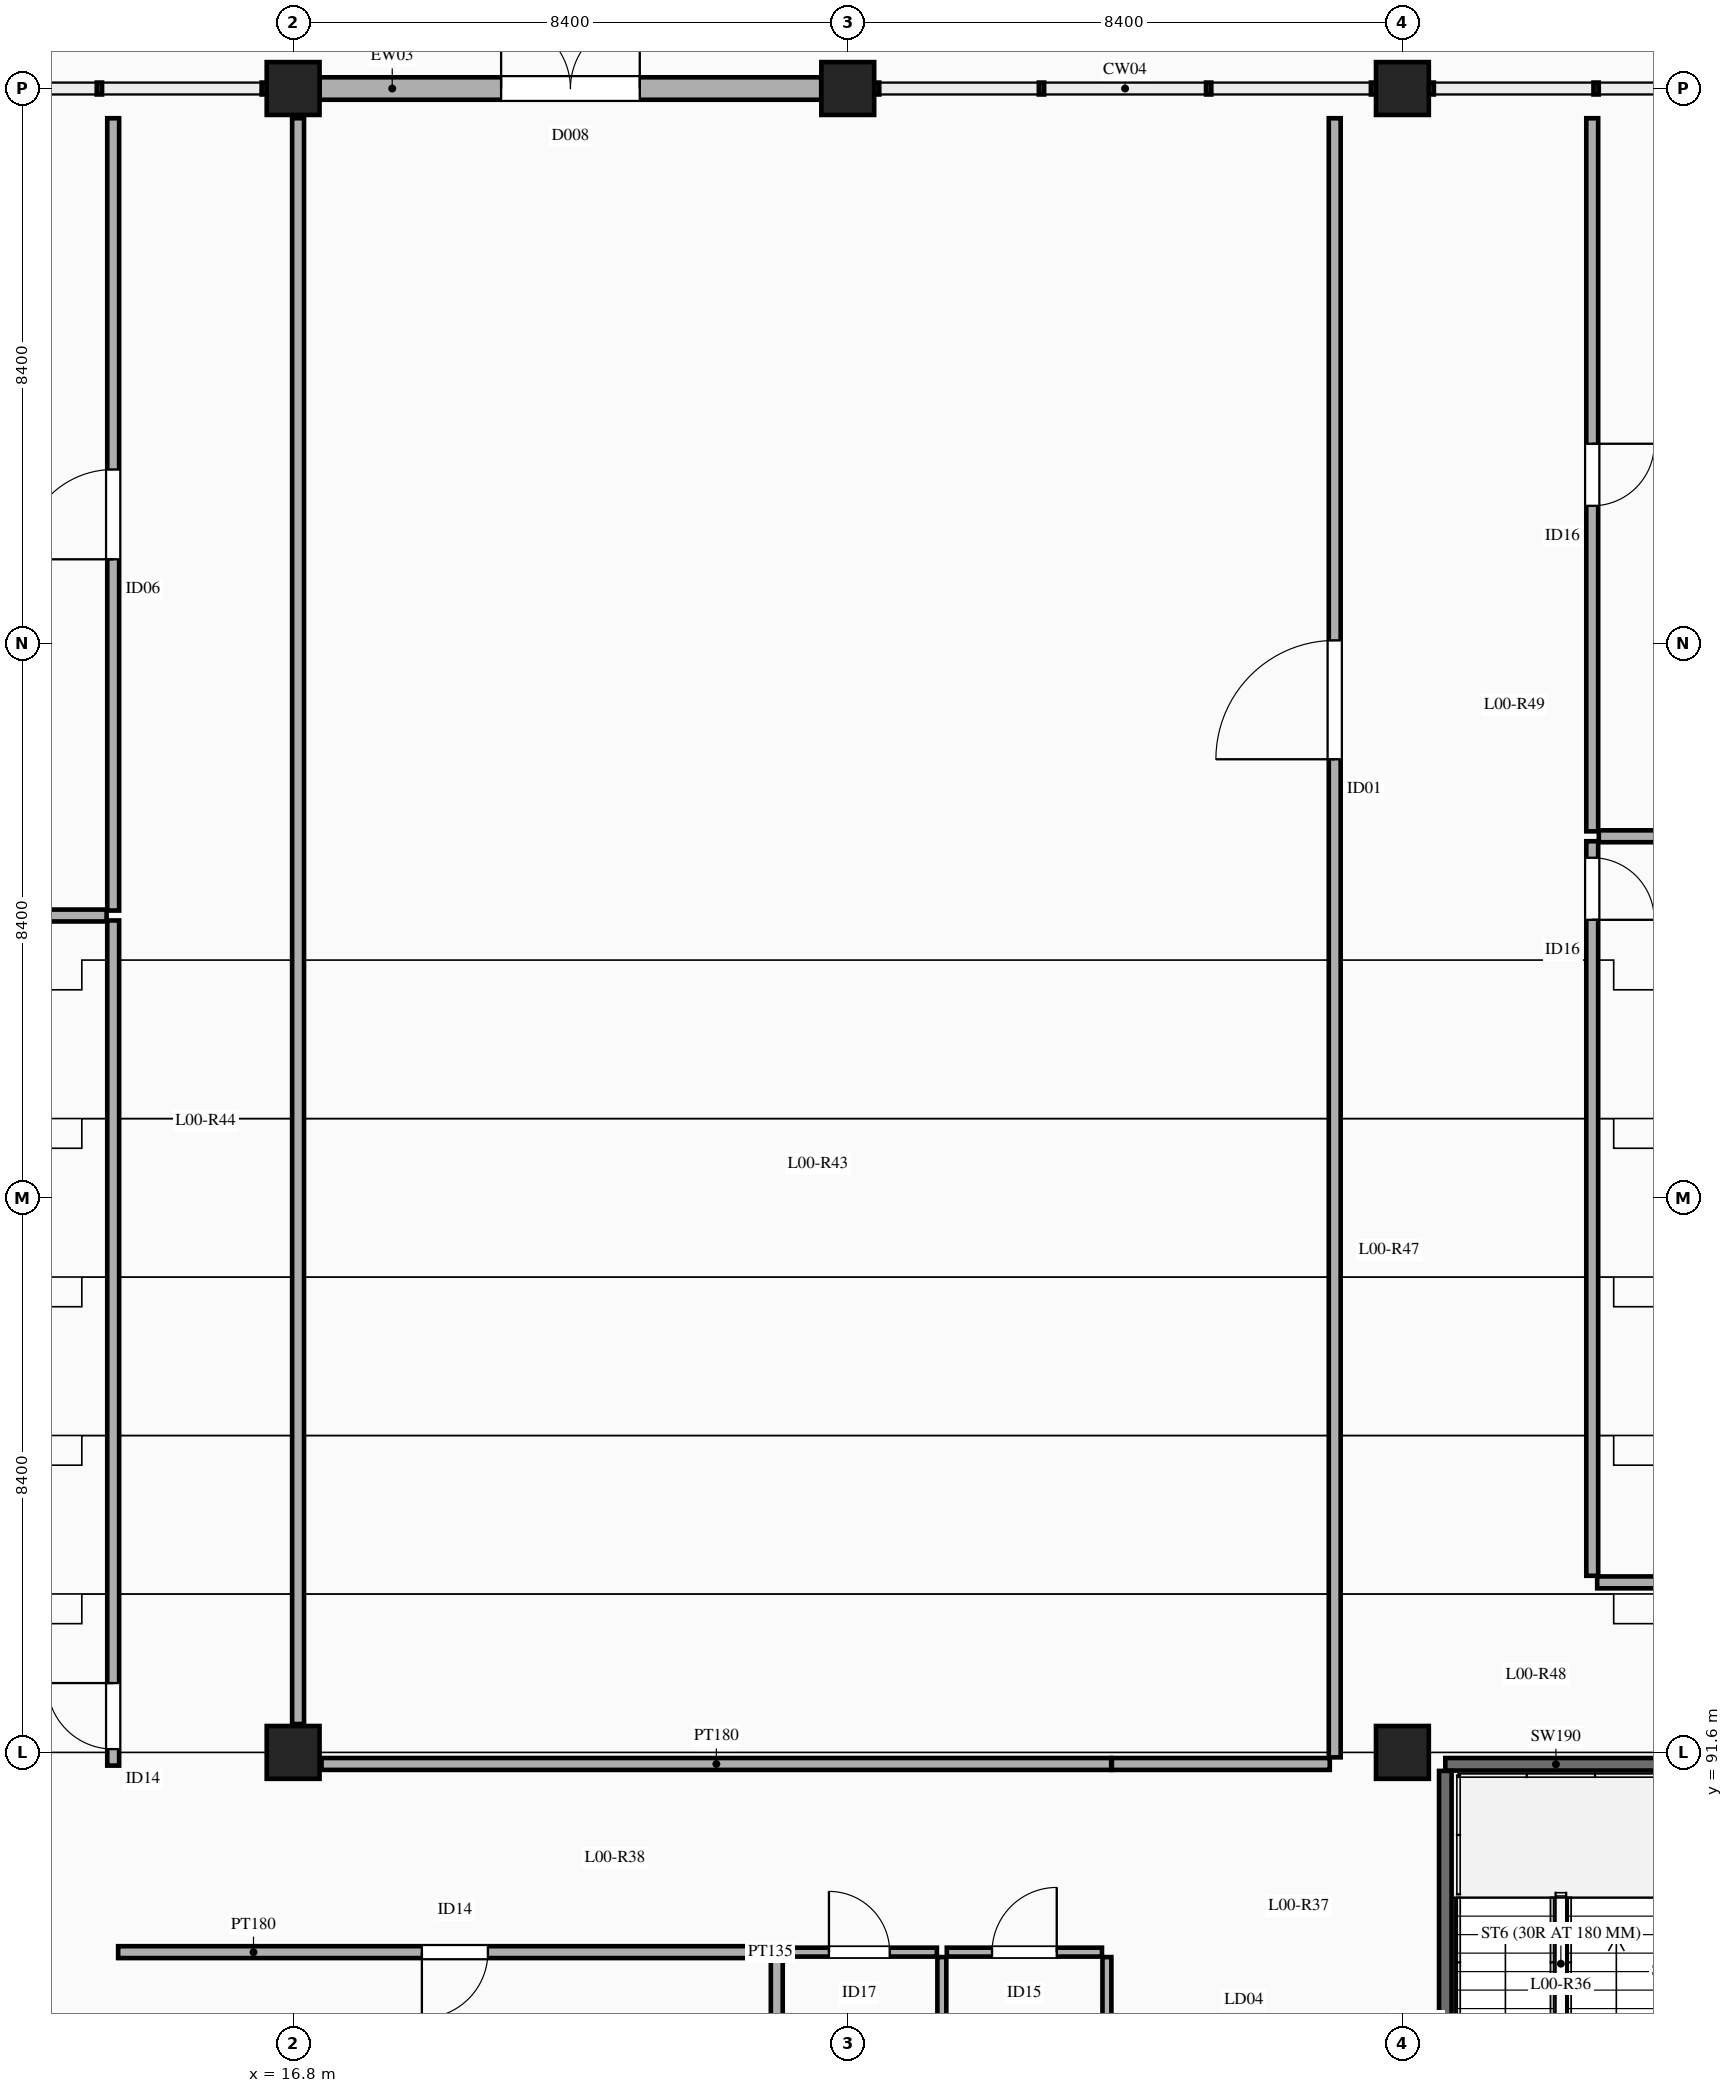
"""IFC4 building model, lengths in metres.
Left out: names, types, materials, properties, quantities, classifications, styles, units other than length and angle.
Written with IfcOpenShell. Run it as: python <this file> out.ifc"""

import sys

from ifc_helpers import new_model, si_unit, direction, frame, frame_2d, origin, origin_2d, place, context, subcontext, project, spatial, rectangle, extrude, element, fill, save


model = new_model("IFC4")
c1 = context("Model", 3, precision=1e-05, world=origin(), true_north=direction((0.0, 1.0)))
c2 = subcontext(c1, "Body", "Model", "MODEL_VIEW")
j1 = project(units=[si_unit("LENGTHUNIT", "METRE"), si_unit("PLANEANGLEUNIT", "RADIAN")], contexts=[c1])
p1 = place(None, origin())
s1 = spatial("IfcSite", under=j1, at=p1, CompositionType="ELEMENT")
p2 = place(p1, origin())
s2 = spatial("IfcBuilding", under=s1, at=p2, CompositionType="ELEMENT")
p3 = place(p2, origin())
s3 = spatial("IfcBuildingStorey", under=s2, at=p3, CompositionType="ELEMENT", Elevation=0.0)
for number, where, z_axis, x_axis in (
    (1, (16.8, 91.6, 0.0), (0.0, 0.0, 1.0), (1.0, 0.0, 0.0)),
    (2, (16.8, 116.8, 0.0), (0.0, 0.0, 1.0), (1.0, 0.0, 0.0)),
    (3, (25.2, 116.8, 0.0), (0.0, 0.0, 1.0), (1.0, 0.0, 0.0)),
    (4, (33.6, 91.6, 0.0), (0.0, 0.0, 1.0), (1.0, 0.0, 0.0)),
    (5, (33.6, 116.8, 0.0), (0.0, 0.0, 1.0), (1.0, 0.0, 0.0)),
):
    element("IfcColumn", number, at=place(p3, frame(where, z_axis=z_axis, x_axis=x_axis)), inside=s3, PredefinedType="COLUMN", context=c2, shape_type="SweptSolid", body=[
        extrude(rectangle(XDim=0.8, YDim=0.8, at=origin_2d()), origin(), (0.0, 0.0, 1.0), 5.4),
    ])
p4 = place(p3, frame((17.202, 116.8, 0.0), z_axis=(0.0, 0.0, 1.0), x_axis=(1.0, 0.0, 0.0)))
e6 = element("IfcWall", 6, at=p4, inside=s3, PredefinedType="SOLIDWALL", context=c2, shape_type="SweptSolid", body=[
    extrude(rectangle(XDim=7.596, YDim=0.34, at=frame_2d((3.798, 0.0))), origin(), (0.0, 0.0, 1.0), 4.65),
])
p5 = place(p4, frame((2.748, 0.0, 0.0)))
e7 = element("IfcOpeningElement", 7, at=p5, cuts=e6, PredefinedType="OPENING", context=c2, shape_type="SweptSolid", body=[
    extrude(rectangle(XDim=2.1, YDim=2.35, at=frame_2d((1.05, 1.175))), frame((0.0, 0.18, 0.0), z_axis=(0.0, -1.0, 0.0), x_axis=(1.0, 0.0, 0.0)), (0.0, 0.0, 1.0), 0.36),
])
p6 = place(p3, frame((34.25, 91.42, 0.0), z_axis=(0.0, 0.0, 1.0), x_axis=(1.0, 0.0, 0.0)))
e8 = element("IfcWall", 8, at=p6, inside=s3, PredefinedType="SOLIDWALL", context=c2, shape_type="SweptSolid", body=[
    extrude(rectangle(XDim=3.5, YDim=0.19, at=frame_2d((1.75, 0.0))), origin(), (0.0, 0.0, 1.0), 5.2),
])
p7 = place(p3, frame((34.25, 83.74, 0.0), z_axis=(0.0, 0.0, 1.0), x_axis=(0.0, 1.0, 0.0)))
e9 = element("IfcWall", 9, at=p7, inside=s3, PredefinedType="SOLIDWALL", context=c2, shape_type="SweptSolid", body=[
    extrude(rectangle(XDim=7.58, YDim=0.19, at=frame_2d((3.79, 0.0))), origin(), (0.0, 0.0, 1.0), 5.2),
])
p8 = place(p3, frame((29.125, 86.5, 0.0), z_axis=(0.0, 0.0, 1.0), x_axis=(0.0, 1.0, 0.0)))
e10 = element("IfcWall", 10, at=p8, inside=s3, PredefinedType="PARTITIONING", context=c2, shape_type="SweptSolid", body=[
    extrude(rectangle(XDim=2.0, YDim=0.135, at=frame_2d((1.0, 0.0))), origin(), (0.0, 0.0, 1.0), 4.35),
])
p9 = place(p3, frame((29.2, 91.425, 0.0), z_axis=(0.0, 0.0, 1.0), x_axis=(1.0, 0.0, 0.0)))
e11 = element("IfcWall", 11, at=p9, inside=s3, PredefinedType="PARTITIONING", context=c2, shape_type="SweptSolid", body=[
    extrude(rectangle(XDim=3.3, YDim=0.18, at=frame_2d((1.65, 0.0))), origin(), (0.0, 0.0, 1.0), 4.35),
])
p10 = place(p3, frame((26.7, 88.575, 0.0), z_axis=(0.0, 0.0, 1.0), x_axis=(1.0, 0.0, 0.0)))
e12 = element("IfcWall", 12, at=p10, inside=s3, PredefinedType="PARTITIONING", context=c2, shape_type="SweptSolid", body=[
    extrude(rectangle(XDim=2.35, YDim=0.135, at=frame_2d((1.175, 0.0))), origin(), (0.0, 0.0, 1.0), 4.35),
])
p11 = place(p10, frame((0.685, 0.0, 0.0)))
e13 = element("IfcOpeningElement", 13, at=p11, cuts=e12, PredefinedType="OPENING", context=c2, shape_type="SweptSolid", body=[
    extrude(rectangle(XDim=0.98, YDim=2.15, at=frame_2d((0.49, 1.075))), frame((0.0, 0.077, 0.0), z_axis=(0.0, -1.0, 0.0), x_axis=(1.0, 0.0, 0.0)), (0.0, 0.0, 1.0), 0.155),
])
p12 = place(p3, frame((24.2, 88.575, 0.0), z_axis=(0.0, 0.0, 1.0), x_axis=(1.0, 0.0, 0.0)))
e14 = element("IfcWall", 14, at=p12, inside=s3, PredefinedType="PARTITIONING", context=c2, shape_type="SweptSolid", body=[
    extrude(rectangle(XDim=2.35, YDim=0.135, at=frame_2d((1.175, 0.0))), origin(), (0.0, 0.0, 1.0), 4.35),
])
p13 = place(p12, frame((0.715, 0.0, 0.0)))
e15 = element("IfcOpeningElement", 15, at=p13, cuts=e14, PredefinedType="OPENING", context=c2, shape_type="SweptSolid", body=[
    extrude(rectangle(XDim=0.92, YDim=2.12, at=frame_2d((0.46, 1.06))), frame((0.0, 0.077, 0.0), z_axis=(0.0, -1.0, 0.0), x_axis=(1.0, 0.0, 0.0)), (0.0, 0.0, 1.0), 0.155),
])
p14 = place(p3, frame((14.15, 88.575, 0.0), z_axis=(0.0, 0.0, 1.0), x_axis=(1.0, 0.0, 0.0)))
e16 = element("IfcWall", 16, at=p14, inside=s3, PredefinedType="PARTITIONING", context=c2, shape_type="SweptSolid", body=[
    extrude(rectangle(XDim=9.9, YDim=0.18, at=frame_2d((4.95, 0.0))), origin(), (0.0, 0.0, 1.0), 4.35),
])
p15 = place(p14, frame((4.6, 0.0, 0.0)))
e17 = element("IfcOpeningElement", 17, at=p15, cuts=e16, PredefinedType="OPENING", context=c2, shape_type="SweptSolid", body=[
    extrude(rectangle(XDim=1.0, YDim=2.15, at=frame_2d((0.5, 1.075))), frame((0.0, 0.1, 0.0), z_axis=(0.0, -1.0, 0.0), x_axis=(1.0, 0.0, 0.0)), (0.0, 0.0, 1.0), 0.2),
])
p16 = place(p3, frame((17.23, 91.425, 0.0), z_axis=(0.0, 0.0, 1.0), x_axis=(1.0, 0.0, 0.0)))
e18 = element("IfcWall", 18, at=p16, inside=s3, PredefinedType="PARTITIONING", context=c2, shape_type="SweptSolid", body=[
    extrude(rectangle(XDim=11.96, YDim=0.18, at=frame_2d((5.98, 0.0))), origin(), (0.0, 0.0, 1.0), 4.35),
])
p17 = place(p3, frame((26.625, 83.6, 0.0), z_axis=(0.0, 0.0, 1.0), x_axis=(0.0, 1.0, 0.0)))
e19 = element("IfcWall", 19, at=p17, inside=s3, PredefinedType="PARTITIONING", context=c2, shape_type="SweptSolid", body=[
    extrude(rectangle(XDim=4.9, YDim=0.135, at=frame_2d((2.45, 0.0))), origin(), (0.0, 0.0, 1.0), 4.35),
])
p18 = place(p3, frame((24.125, 83.6, 0.0), z_axis=(0.0, 0.0, 1.0), x_axis=(0.0, 1.0, 0.0)))
e20 = element("IfcWall", 20, at=p18, inside=s3, PredefinedType="PARTITIONING", context=c2, shape_type="SweptSolid", body=[
    extrude(rectangle(XDim=4.875, YDim=0.18, at=frame_2d((2.438, 0.0))), origin(), (0.0, 0.0, 1.0), 4.35),
])
p19 = place(p3, frame((16.875, 92.03, 0.0), z_axis=(0.0, 0.0, 1.0), x_axis=(0.0, 1.0, 0.0)))
e21 = element("IfcWall", 21, at=p19, inside=s3, PredefinedType="PARTITIONING", context=c2, shape_type="SweptSolid", body=[
    extrude(rectangle(XDim=24.32, YDim=0.18, at=frame_2d((12.16, 0.0))), origin(), (0.0, 0.0, 1.0), 4.35),
])
p20 = place(p3, frame((32.575, 91.525, 0.0), z_axis=(0.0, 0.0, 1.0), x_axis=(0.0, 1.0, 0.0)))
e22 = element("IfcWall", 22, at=p20, inside=s3, PredefinedType="PARTITIONING", context=c2, shape_type="SweptSolid", body=[
    extrude(rectangle(XDim=24.825, YDim=0.18, at=frame_2d((12.413, 0.0))), origin(), (0.0, 0.0, 1.0), 4.35),
])
p21 = place(p20, frame((15.116, 0.0, 0.0)))
e23 = element("IfcOpeningElement", 23, at=p21, cuts=e22, PredefinedType="OPENING", context=c2, shape_type="SweptSolid", body=[
    extrude(rectangle(XDim=1.8, YDim=2.4, at=frame_2d((0.9, 1.2))), frame((0.0, 0.1, 0.0), z_axis=(0.0, -1.0, 0.0), x_axis=(1.0, 0.0, 0.0)), (0.0, 0.0, 1.0), 0.2),
])
p22 = place(p3, frame((14.075, 91.4, 0.0), z_axis=(0.0, 0.0, 1.0), x_axis=(0.0, 1.0, 0.0)))
e24 = element("IfcWall", 24, at=p22, inside=s3, PredefinedType="PARTITIONING", context=c2, shape_type="SweptSolid", body=[
    extrude(rectangle(XDim=12.8, YDim=0.18, at=frame_2d((6.4, 0.0))), origin(), (0.0, 0.0, 1.0), 4.35),
])
p23 = place(p22, frame((0.25, 0.0, 0.0)))
e25 = element("IfcOpeningElement", 25, at=p23, cuts=e24, PredefinedType="OPENING", context=c2, shape_type="SweptSolid", body=[
    extrude(rectangle(XDim=1.0, YDim=2.15, at=frame_2d((0.5, 1.075))), frame((0.0, 0.1, 0.0), z_axis=(0.0, -1.0, 0.0), x_axis=(1.0, 0.0, 0.0)), (0.0, 0.0, 1.0), 0.2),
])
p24 = place(p3, frame((14.075, 104.35, 0.0), z_axis=(0.0, 0.0, 1.0), x_axis=(0.0, 1.0, 0.0)))
e26 = element("IfcWall", 26, at=p24, inside=s3, PredefinedType="PARTITIONING", context=c2, shape_type="SweptSolid", body=[
    extrude(rectangle(XDim=12.0, YDim=0.18, at=frame_2d((6.0, 0.0))), origin(), (0.0, 0.0, 1.0), 4.35),
])
p25 = place(p24, frame((5.32, 0.0, 0.0)))
e27 = element("IfcOpeningElement", 27, at=p25, cuts=e26, PredefinedType="OPENING", context=c2, shape_type="SweptSolid", body=[
    extrude(rectangle(XDim=1.36, YDim=2.3, at=frame_2d((0.68, 1.15))), frame((0.0, 0.1, 0.0), z_axis=(0.0, -1.0, 0.0), x_axis=(1.0, 0.0, 0.0)), (0.0, 0.0, 1.0), 0.2),
])
p26 = place(p3, frame((8.85, 104.275, 0.0), z_axis=(0.0, 0.0, 1.0), x_axis=(1.0, 0.0, 0.0)))
e28 = element("IfcWall", 28, at=p26, inside=s3, PredefinedType="PARTITIONING", context=c2, shape_type="SweptSolid", body=[
    extrude(rectangle(XDim=5.125, YDim=0.18, at=frame_2d((2.562, 0.0))), origin(), (0.0, 0.0, 1.0), 4.35),
])
p27 = place(p3, frame((36.55, 94.175, 0.0), z_axis=(0.0, 0.0, 1.0), x_axis=(1.0, 0.0, 0.0)))
e29 = element("IfcWall", 29, at=p27, inside=s3, PredefinedType="PARTITIONING", context=c2, shape_type="SweptSolid", body=[
    extrude(rectangle(XDim=4.95, YDim=0.18, at=frame_2d((2.475, 0.0))), origin(), (0.0, 0.0, 1.0), 1.963),
])
p28 = place(p3, frame((36.475, 94.275, 0.0), z_axis=(0.0, 0.0, 1.0), x_axis=(0.0, 1.0, 0.0)))
e30 = element("IfcWall", 30, at=p28, inside=s3, PredefinedType="PARTITIONING", context=c2, shape_type="SweptSolid", body=[
    extrude(rectangle(XDim=11.125, YDim=0.18, at=frame_2d((5.562, 0.0))), origin(), (0.0, 0.0, 1.0), 4.35),
])
p29 = place(p28, frame((9.935, 0.0, 0.0)))
e31 = element("IfcOpeningElement", 31, at=p29, cuts=e30, PredefinedType="OPENING", context=c2, shape_type="SweptSolid", body=[
    extrude(rectangle(XDim=0.94, YDim=2.1, at=frame_2d((0.47, 1.05))), frame((0.0, 0.1, 0.0), z_axis=(0.0, -1.0, 0.0), x_axis=(1.0, 0.0, 0.0)), (0.0, 0.0, 1.0), 0.2),
])
p30 = place(p3, frame((36.475, 105.55, 0.0), z_axis=(0.0, 0.0, 1.0), x_axis=(0.0, 1.0, 0.0)))
e32 = element("IfcWall", 32, at=p30, inside=s3, PredefinedType="PARTITIONING", context=c2, shape_type="SweptSolid", body=[
    extrude(rectangle(XDim=10.8, YDim=0.18, at=frame_2d((5.4, 0.0))), origin(), (0.0, 0.0, 1.0), 4.35),
])
p31 = place(p30, frame((4.93, 0.0, 0.0)))
e33 = element("IfcOpeningElement", 33, at=p31, cuts=e32, PredefinedType="OPENING", context=c2, shape_type="SweptSolid", body=[
    extrude(rectangle(XDim=0.94, YDim=2.1, at=frame_2d((0.47, 1.05))), frame((0.0, 0.1, 0.0), z_axis=(0.0, -1.0, 0.0), x_axis=(1.0, 0.0, 0.0)), (0.0, 0.0, 1.0), 0.2),
])
p32 = place(p3, frame((36.575, 105.475, 0.0), z_axis=(0.0, 0.0, 1.0), x_axis=(1.0, 0.0, 0.0)))
e34 = element("IfcWall", 34, at=p32, inside=s3, PredefinedType="PARTITIONING", context=c2, shape_type="SweptSolid", body=[
    extrude(rectangle(XDim=4.975, YDim=0.18, at=frame_2d((2.488, 0.0))), origin(), (0.0, 0.0, 1.0), 4.35),
])
p33 = place(p5, origin())
e35 = element("IfcDoor", 35, at=p33, inside=s3, OperationType="DOUBLE_DOOR_SINGLE_SWING", PredefinedType="DOOR", context=c2, shape_type="SweptSolid", body=[
    extrude(rectangle(XDim=2.1, YDim=2.35, at=frame_2d((1.05, 1.175))), frame((0.0, 0.025, 0.0), z_axis=(0.0, -1.0, 0.0), x_axis=(1.0, 0.0, 0.0)), (0.0, 0.0, 1.0), 0.05),
])
fill(e7, e35)
p34 = place(p11, origin())
e36 = element("IfcDoor", 36, at=p34, inside=s3, OperationType="SINGLE_SWING_RIGHT", PredefinedType="DOOR", context=c2, shape_type="SweptSolid", body=[
    extrude(rectangle(XDim=0.98, YDim=2.15, at=frame_2d((0.49, 1.075))), frame((0.0, 0.025, 0.0), z_axis=(0.0, -1.0, 0.0), x_axis=(1.0, 0.0, 0.0)), (0.0, 0.0, 1.0), 0.05),
])
fill(e13, e36)
p35 = place(p13, origin())
e37 = element("IfcDoor", 37, at=p35, inside=s3, OperationType="SINGLE_SWING_LEFT", PredefinedType="DOOR", context=c2, shape_type="SweptSolid", body=[
    extrude(rectangle(XDim=0.92, YDim=2.12, at=frame_2d((0.46, 1.06))), frame((0.0, 0.025, 0.0), z_axis=(0.0, -1.0, 0.0), x_axis=(1.0, 0.0, 0.0)), (0.0, 0.0, 1.0), 0.05),
])
fill(e15, e37)
p36 = place(p15, frame((1.0, 0.0, 0.0), z_axis=(0.0, 0.0, 1.0), x_axis=(-1.0, 0.0, 0.0)))
e38 = element("IfcDoor", 38, at=p36, inside=s3, OperationType="SINGLE_SWING_RIGHT", PredefinedType="DOOR", context=c2, shape_type="SweptSolid", body=[
    extrude(rectangle(XDim=1.0, YDim=2.15, at=frame_2d((0.5, 1.075))), frame((0.0, 0.025, 0.0), z_axis=(0.0, -1.0, 0.0), x_axis=(1.0, 0.0, 0.0)), (0.0, 0.0, 1.0), 0.05),
])
fill(e17, e38)
p37 = place(p21, origin())
e39 = element("IfcDoor", 39, at=p37, inside=s3, OperationType="SINGLE_SWING_LEFT", PredefinedType="DOOR", context=c2, shape_type="SweptSolid", body=[
    extrude(rectangle(XDim=1.8, YDim=2.4, at=frame_2d((0.9, 1.2))), frame((0.0, 0.025, 0.0), z_axis=(0.0, -1.0, 0.0), x_axis=(1.0, 0.0, 0.0)), (0.0, 0.0, 1.0), 0.05),
])
fill(e23, e39)
p38 = place(p23, origin())
e40 = element("IfcDoor", 40, at=p38, inside=s3, OperationType="SINGLE_SWING_RIGHT", PredefinedType="DOOR", context=c2, shape_type="SweptSolid", body=[
    extrude(rectangle(XDim=1.0, YDim=2.15, at=frame_2d((0.5, 1.075))), frame((0.0, 0.025, 0.0), z_axis=(0.0, -1.0, 0.0), x_axis=(1.0, 0.0, 0.0)), (0.0, 0.0, 1.0), 0.05),
])
fill(e25, e40)
p39 = place(p25, origin())
e41 = element("IfcDoor", 41, at=p39, inside=s3, OperationType="SINGLE_SWING_LEFT", PredefinedType="DOOR", context=c2, shape_type="SweptSolid", body=[
    extrude(rectangle(XDim=1.36, YDim=2.3, at=frame_2d((0.68, 1.15))), frame((0.0, 0.025, 0.0), z_axis=(0.0, -1.0, 0.0), x_axis=(1.0, 0.0, 0.0)), (0.0, 0.0, 1.0), 0.05),
])
fill(e27, e41)
p40 = place(p29, frame((0.94, 0.0, 0.0), z_axis=(0.0, 0.0, 1.0), x_axis=(-1.0, 0.0, 0.0)))
e42 = element("IfcDoor", 42, at=p40, inside=s3, OperationType="SINGLE_SWING_RIGHT", PredefinedType="DOOR", context=c2, shape_type="SweptSolid", body=[
    extrude(rectangle(XDim=0.94, YDim=2.1, at=frame_2d((0.47, 1.05))), frame((0.0, 0.025, 0.0), z_axis=(0.0, -1.0, 0.0), x_axis=(1.0, 0.0, 0.0)), (0.0, 0.0, 1.0), 0.05),
])
fill(e31, e42)
p41 = place(p31, frame((0.94, 0.0, 0.0), z_axis=(0.0, 0.0, 1.0), x_axis=(-1.0, 0.0, 0.0)))
e43 = element("IfcDoor", 43, at=p41, inside=s3, OperationType="SINGLE_SWING_LEFT", PredefinedType="DOOR", context=c2, shape_type="SweptSolid", body=[
    extrude(rectangle(XDim=0.94, YDim=2.1, at=frame_2d((0.47, 1.05))), frame((0.0, 0.025, 0.0), z_axis=(0.0, -1.0, 0.0), x_axis=(1.0, 0.0, 0.0)), (0.0, 0.0, 1.0), 0.05),
])
fill(e33, e43)
save(model, sys.argv[1])
